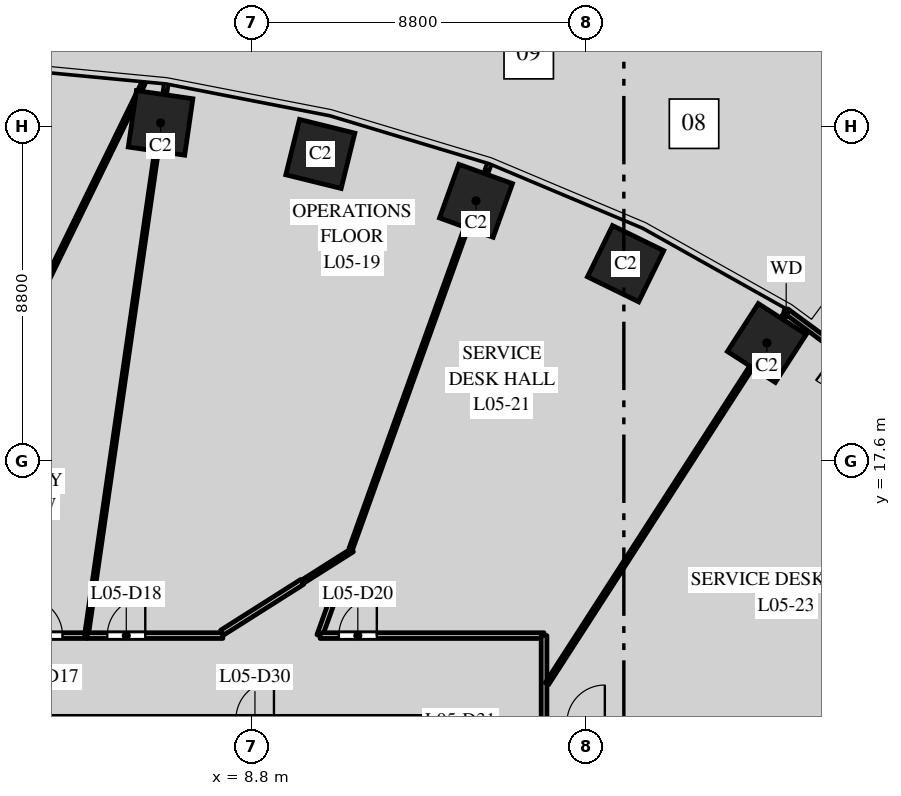
"""IFC4 building model, lengths in metres.
Left out: names, types, materials, properties, quantities, classifications, styles, units other than length and angle.
Written with IfcOpenShell. Run it as: python <this file> out.ifc"""

import sys

from ifc_helpers import new_model, si_unit, direction, frame, frame_2d, origin, origin_2d, place, context, subcontext, project, spatial, rectangle, extrude, element, fill, save


model = new_model("IFC4")
c1 = context("Model", 3, precision=1e-05, world=origin(), true_north=direction((0.0, 1.0)))
c2 = subcontext(c1, "Body", "Model", "MODEL_VIEW")
j1 = project(units=[si_unit("LENGTHUNIT", "METRE"), si_unit("PLANEANGLEUNIT", "RADIAN")], contexts=[c1])
p1 = place(None, origin())
s1 = spatial("IfcSite", under=j1, at=p1, CompositionType="ELEMENT")
p2 = place(p1, origin())
s2 = spatial("IfcBuilding", under=s1, at=p2, CompositionType="ELEMENT")
p3 = place(p2, frame((0.0, 0.0, 30.5)))
s3 = spatial("IfcBuildingStorey", under=s2, at=p3, CompositionType="ELEMENT", Elevation=30.5)
for number, where, z_axis, x_axis in (
    (1, (22.362, 20.7, 0.0), (0.0, 0.0, 1.0), (-0.84, 0.542, 0.0)),
    (2, (18.646, 22.785, 0.0), (0.0, 0.0, 1.0), (-0.898, 0.439, 0.0)),
    (3, (14.709, 24.441, 0.0), (0.0, 0.0, 1.0), (-0.941, 0.338, 0.0)),
    (4, (10.613, 25.674, 0.0), (0.0, 0.0, 1.0), (-0.971, 0.24, 0.0)),
    (5, (6.409, 26.491, 0.0), (0.0, 0.0, 1.0), (-0.99, 0.143, 0.0)),
):
    element("IfcColumn", number, at=place(p3, frame(where, z_axis=z_axis, x_axis=x_axis)), inside=s3, PredefinedType="COLUMN", context=c2, shape_type="SweptSolid", body=[
        extrude(rectangle(XDim=1.5, YDim=1.5, at=origin_2d()), origin(), (0.0, 0.0, 1.0), 4.0),
    ])
p4 = place(p3, frame((26.435, 18.911, 0.0), z_axis=(0.0, 0.0, 1.0), x_axis=(-0.805154287598, 0.593065403782, 0.0)))
e6 = element("IfcWall", 6, at=p4, inside=s3, PredefinedType="STANDARD", context=c2, shape_type="SweptSolid", body=[
    extrude(rectangle(XDim=4.425, YDim=0.15, at=frame_2d((2.212, 0.0))), origin(), (0.0, 0.0, 1.0), 3.7),
])
p5 = place(p4, frame((1.712, 0.0, 0.0)))
e7 = element("IfcOpeningElement", 7, at=p5, cuts=e6, PredefinedType="OPENING", context=c2, shape_type="SweptSolid", body=[
    extrude(rectangle(XDim=1.0, YDim=2.4, at=frame_2d((0.5, 1.2))), frame((0.0, 0.085, 0.0), z_axis=(0.0, -1.0, 0.0), x_axis=(1.0, 0.0, 0.0)), (0.0, 0.0, 1.0), 0.17),
])
p6 = place(p3, frame((-14.3, 10.8, 0.0), z_axis=(0.0, 0.0, 1.0), x_axis=(1.0, 0.0, 0.0)))
e8 = element("IfcWall", 8, at=p6, inside=s3, PredefinedType="PARTITIONING", context=c2, shape_type="SweptSolid", body=[
    extrude(rectangle(XDim=28.6, YDim=0.15, at=frame_2d((14.3, 0.0))), origin(), (0.0, 0.0, 1.0), 2.85),
])
p7 = place(p6, frame((10.66, 0.0, 0.0)))
e9 = element("IfcOpeningElement", 9, at=p7, cuts=e8, PredefinedType="OPENING", context=c2, shape_type="SweptSolid", body=[
    extrude(rectangle(XDim=1.0, YDim=2.1, at=frame_2d((0.5, 1.05))), frame((0.0, 0.085, 0.0), z_axis=(0.0, -1.0, 0.0), x_axis=(1.0, 0.0, 0.0)), (0.0, 0.0, 1.0), 0.17),
])
p8 = place(p6, frame((15.427, 0.0, 0.0)))
e10 = element("IfcOpeningElement", 10, at=p8, cuts=e8, PredefinedType="OPENING", context=c2, shape_type="SweptSolid", body=[
    extrude(rectangle(XDim=1.0, YDim=2.1, at=frame_2d((0.5, 1.05))), frame((0.0, 0.085, 0.0), z_axis=(0.0, -1.0, 0.0), x_axis=(1.0, 0.0, 0.0)), (0.0, 0.0, 1.0), 0.17),
])
p9 = place(p6, frame((22.693, 0.0, 0.0)))
e11 = element("IfcOpeningElement", 11, at=p9, cuts=e8, PredefinedType="OPENING", context=c2, shape_type="SweptSolid", body=[
    extrude(rectangle(XDim=1.0, YDim=2.1, at=frame_2d((0.5, 1.05))), frame((0.0, 0.085, 0.0), z_axis=(0.0, -1.0, 0.0), x_axis=(1.0, 0.0, 0.0)), (0.0, 0.0, 1.0), 0.17),
])
p10 = place(p3, frame((-0.365, 14.605, 0.0), z_axis=(0.0, 0.0, 1.0), x_axis=(0.439218344443, 0.898380345903, 0.0)))
e12 = element("IfcWall", 12, at=p10, inside=s3, PredefinedType="PARTITIONING", context=c2, shape_type="SweptSolid", body=[
    extrude(rectangle(XDim=14.396, YDim=0.1, at=frame_2d((7.198, 0.0))), origin(), (0.0, 0.0, 1.0), 2.85),
])
p11 = place(p3, frame((0.701, 13.0, 0.0), z_axis=(0.0, 0.0, 1.0), x_axis=(1.0, 0.0, 0.0)))
e13 = element("IfcWall", 13, at=p11, inside=s3, PredefinedType="PARTITIONING", context=c2, shape_type="SweptSolid", body=[
    extrude(rectangle(XDim=3.758, YDim=0.15, at=frame_2d((1.879, 0.0))), origin(), (0.0, 0.0, 1.0), 2.85),
])
p12 = place(p11, frame((2.128, 0.0, 0.0)))
e14 = element("IfcOpeningElement", 14, at=p12, cuts=e13, PredefinedType="OPENING", context=c2, shape_type="SweptSolid", body=[
    extrude(rectangle(XDim=1.0, YDim=2.1, at=frame_2d((0.5, 1.05))), frame((0.0, 0.085, 0.0), z_axis=(0.0, -1.0, 0.0), x_axis=(1.0, 0.0, 0.0)), (0.0, 0.0, 1.0), 0.17),
])
p13 = place(p3, frame((4.459, 13.004, 0.0), z_axis=(0.0, 0.0, 1.0), x_axis=(0.143087196312, 0.98971008596, 0.0)))
e15 = element("IfcWall", 15, at=p13, inside=s3, PredefinedType="PARTITIONING", context=c2, shape_type="SweptSolid", body=[
    extrude(rectangle(XDim=14.628, YDim=0.1, at=frame_2d((7.314, 0.0))), origin(), (0.0, 0.0, 1.0), 2.85),
])
p14 = place(p3, frame((4.479, 13.0, 0.0), z_axis=(0.0, 0.0, 1.0), x_axis=(1.0, 0.0, 0.0)))
e16 = element("IfcWall", 16, at=p14, inside=s3, PredefinedType="PARTITIONING", context=c2, shape_type="SweptSolid", body=[
    extrude(rectangle(XDim=3.568, YDim=0.15, at=frame_2d((1.784, 0.0))), origin(), (0.0, 0.0, 1.0), 2.85),
])
p15 = place(p14, frame((0.528, 0.0, 0.0)))
e17 = element("IfcOpeningElement", 17, at=p15, cuts=e16, PredefinedType="OPENING", context=c2, shape_type="SweptSolid", body=[
    extrude(rectangle(XDim=1.0, YDim=2.1, at=frame_2d((0.5, 1.05))), frame((0.0, 0.085, 0.0), z_axis=(0.0, -1.0, 0.0), x_axis=(1.0, 0.0, 0.0)), (0.0, 0.0, 1.0), 0.17),
])
p16 = place(p3, frame((8.028, 13.077, 0.0), z_axis=(0.0, 0.0, 1.0), x_axis=(0.844718865656, 0.53521027457, 0.0)))
e18 = element("IfcWall", 18, at=p16, inside=s3, PredefinedType="PARTITIONING", context=c2, shape_type="SweptSolid", body=[
    extrude(rectangle(XDim=2.497, YDim=0.15, at=frame_2d((1.248, 0.0))), origin(), (0.0, 0.0, 1.0), 3.7),
])
p17 = place(p3, frame((10.137, 14.413, 0.0), z_axis=(0.0, 0.0, 1.0), x_axis=(0.844849680057, 0.535003755228, 0.0)))
e19 = element("IfcWall", 19, at=p17, inside=s3, PredefinedType="PARTITIONING", context=c2, shape_type="SweptSolid", body=[
    extrude(rectangle(XDim=1.562, YDim=0.1, at=frame_2d((0.781, 0.0))), origin(), (0.0, 0.0, 1.0), 3.7),
])
p18 = place(p3, frame((10.595, 13.0, 0.0), z_axis=(0.0, 0.0, 1.0), x_axis=(0.338659506624, 0.940908995904, 0.0)))
e20 = element("IfcWall", 20, at=p18, inside=s3, PredefinedType="PARTITIONING", context=c2, shape_type="SweptSolid", body=[
    extrude(rectangle(XDim=0.865, YDim=0.15, at=frame_2d((0.433, 0.0))), origin(), (0.0, 0.0, 1.0), 3.7),
])
p19 = place(p3, frame((10.607, 13.0, 0.0), z_axis=(0.0, 0.0, 1.0), x_axis=(1.0, 0.0, 0.0)))
e21 = element("IfcWall", 21, at=p19, inside=s3, PredefinedType="PARTITIONING", context=c2, shape_type="SweptSolid", body=[
    extrude(rectangle(XDim=5.893, YDim=0.15, at=frame_2d((2.947, 0.0))), origin(), (0.0, 0.0, 1.0), 3.7),
])
p20 = place(p19, frame((0.493, 0.0, 0.0)))
e22 = element("IfcOpeningElement", 22, at=p20, cuts=e21, PredefinedType="OPENING", context=c2, shape_type="SweptSolid", body=[
    extrude(rectangle(XDim=1.0, YDim=2.1, at=frame_2d((0.5, 1.05))), frame((0.0, 0.085, 0.0), z_axis=(0.0, -1.0, 0.0), x_axis=(1.0, 0.0, 0.0)), (0.0, 0.0, 1.0), 0.17),
])
p21 = place(p3, frame((11.416, 15.282, 0.0), z_axis=(0.0, 0.0, 1.0), x_axis=(0.338364268616, 0.94101520802, 0.0)))
e23 = element("IfcWall", 23, at=p21, inside=s3, PredefinedType="PARTITIONING", context=c2, shape_type="SweptSolid", body=[
    extrude(rectangle(XDim=10.734, YDim=0.1, at=frame_2d((5.367, 0.0))), origin(), (0.0, 0.0, 1.0), 3.7),
])
p22 = place(p3, frame((16.5, 10.7, 0.0), z_axis=(0.0, 0.0, 1.0), x_axis=(0.0, 1.0, 0.0)))
e24 = element("IfcWall", 24, at=p22, inside=s3, PredefinedType="PARTITIONING", context=c2, shape_type="SweptSolid", body=[
    extrude(rectangle(XDim=2.3, YDim=0.15, at=frame_2d((1.15, 0.0))), origin(), (0.0, 0.0, 1.0), 3.7),
])
p23 = place(p3, frame((16.575, 11.733, 0.0), z_axis=(0.0, 0.0, 1.0), x_axis=(0.54222594427, 0.840232720953, 0.0)))
e25 = element("IfcWall", 25, at=p23, inside=s3, PredefinedType="PARTITIONING", context=c2, shape_type="SweptSolid", body=[
    extrude(rectangle(XDim=11.674, YDim=0.1, at=frame_2d((5.837, 0.0))), origin(), (0.0, 0.0, 1.0), 3.7),
])
p24 = place(p12, origin())
e26 = element("IfcDoor", 26, at=p24, inside=s3, OperationType="SINGLE_SWING_LEFT", PredefinedType="DOOR", context=c2, shape_type="SweptSolid", body=[
    extrude(rectangle(XDim=1.0, YDim=2.1, at=frame_2d((0.5, 1.05))), frame((0.0, 0.025, 0.0), z_axis=(0.0, -1.0, 0.0), x_axis=(1.0, 0.0, 0.0)), (0.0, 0.0, 1.0), 0.05),
])
fill(e14, e26)
p25 = place(p15, origin())
e27 = element("IfcDoor", 27, at=p25, inside=s3, OperationType="SINGLE_SWING_RIGHT", PredefinedType="DOOR", context=c2, shape_type="SweptSolid", body=[
    extrude(rectangle(XDim=1.0, YDim=2.1, at=frame_2d((0.5, 1.05))), frame((0.0, 0.025, 0.0), z_axis=(0.0, -1.0, 0.0), x_axis=(1.0, 0.0, 0.0)), (0.0, 0.0, 1.0), 0.05),
])
fill(e17, e27)
p26 = place(p20, origin())
e28 = element("IfcDoor", 28, at=p26, inside=s3, OperationType="SINGLE_SWING_RIGHT", PredefinedType="DOOR", context=c2, shape_type="SweptSolid", body=[
    extrude(rectangle(XDim=1.0, YDim=2.1, at=frame_2d((0.5, 1.05))), frame((0.0, 0.025, 0.0), z_axis=(0.0, -1.0, 0.0), x_axis=(1.0, 0.0, 0.0)), (0.0, 0.0, 1.0), 0.05),
])
fill(e22, e28)
save(model, sys.argv[1])
